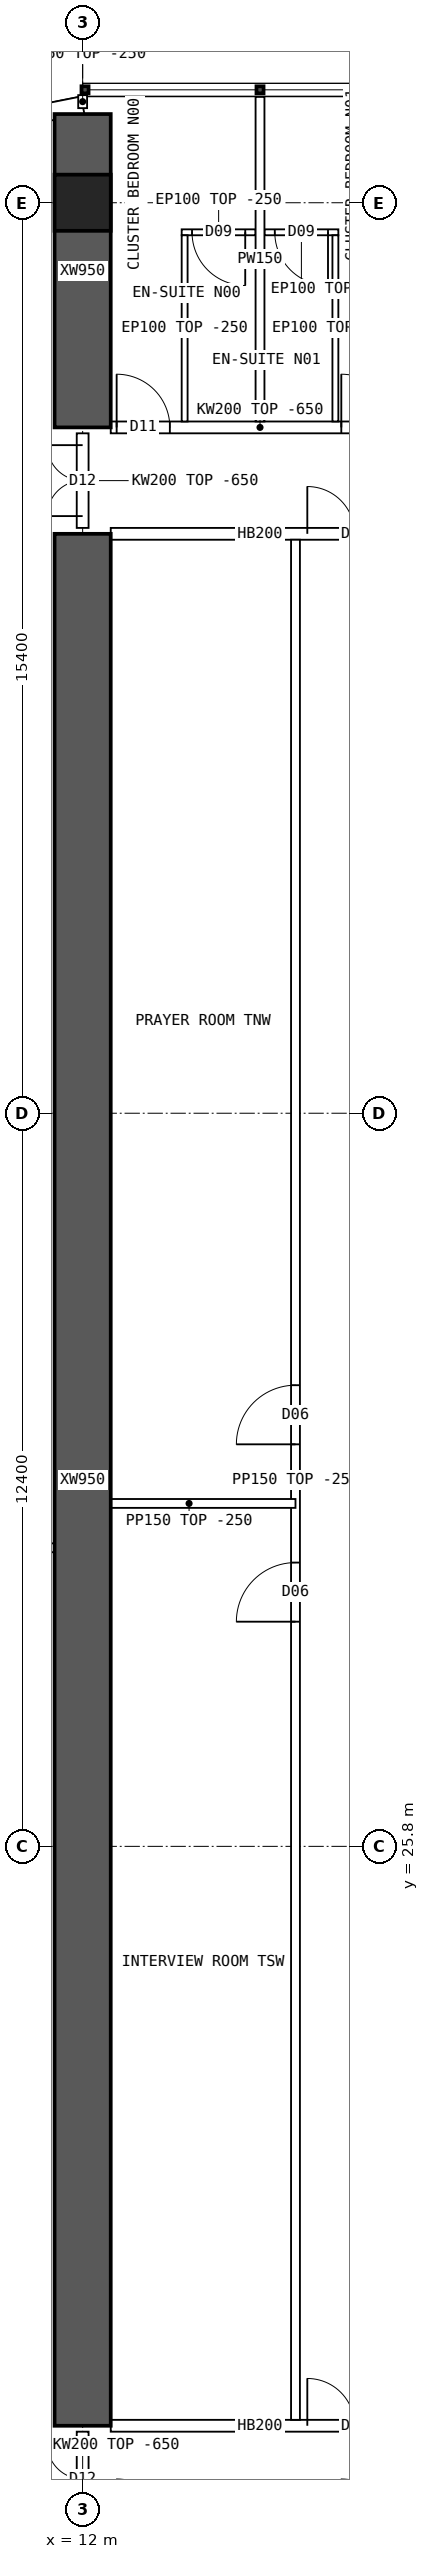
"""IFC4 building model, lengths in metres.
Left out: names, types, materials, properties, quantities, classifications, styles, units other than length and angle.
Written with IfcOpenShell. Run it as: python <this file> out.ifc"""

import sys

from ifc_helpers import new_model, si_unit, direction, frame, frame_2d, origin, origin_2d, place, context, subcontext, project, spatial, polyline, rectangle, hollow_rectangle, outline, extrude, element, fill, save


model = new_model("IFC4")
c1 = context("Model", 3, precision=1e-05, world=origin(), true_north=direction((0.0, 1.0)))
c2 = subcontext(c1, "Body", "Model", "MODEL_VIEW")
j1 = project(units=[si_unit("LENGTHUNIT", "METRE"), si_unit("PLANEANGLEUNIT", "RADIAN")], contexts=[c1])
p1 = place(None, origin())
s1 = spatial("IfcSite", under=j1, at=p1, CompositionType="ELEMENT")
p2 = place(p1, origin())
s2 = spatial("IfcBuilding", under=s1, at=p2, CompositionType="ELEMENT")
p3 = place(p2, frame((0.0, 0.0, 121.9)))
s3 = spatial("IfcBuildingStorey", under=s2, at=p3, CompositionType="ELEMENT", Elevation=121.9)
p4 = place(p3, frame((12.0, 53.6, 0.0), z_axis=(0.0, 0.0, 1.0), x_axis=(1.0, 0.0, 0.0)))
e1 = element("IfcColumn", 1, at=p4, inside=s3, PredefinedType="COLUMN", context=c2, shape_type="SweptSolid", body=[
    extrude(hollow_rectangle(XDim=0.95, YDim=0.95, WallThickness=0.095, at=origin_2d()), origin(), (0.0, 0.0, 1.0), 3.75),
])
p5 = place(p3, frame((12.0, 49.8, 0.0), z_axis=(0.0, 0.0, 1.0), x_axis=(0.0, 1.0, 0.0)))
e2 = element("IfcWall", 2, at=p5, inside=s3, PredefinedType="SHEAR", context=c2, shape_type="SweptSolid", body=[
    extrude(rectangle(XDim=5.3, YDim=0.95, at=frame_2d((2.65, 0.0))), origin(), (0.0, 0.0, 1.0), 3.75),
])
p6 = place(p3, frame((12.0, 16.0, 0.0), z_axis=(0.0, 0.0, 1.0), x_axis=(0.0, 1.0, 0.0)))
e3 = element("IfcWall", 3, at=p6, inside=s3, PredefinedType="SHEAR", context=c2, shape_type="SweptSolid", body=[
    extrude(rectangle(XDim=32.0, YDim=0.95, at=frame_2d((16.0, 0.0))), origin(), (0.0, 0.0, 1.0), 3.75),
])
p7 = place(p3, frame((12.0, 55.25, 0.0), z_axis=(0.0, 0.0, 1.0), x_axis=(-0.980787251524, -0.195080412259, 0.0)))
e4 = element("IfcWall", 4, at=p7, inside=s3, PredefinedType="SOLIDWALL", context=c2, shape_type="SweptSolid", body=[
    extrude(outline(polyline([(-0.03, -0.15), (3.249, -0.15), (3.189, 0.15), (0.03, 0.15), (-0.03, -0.15)])), origin(), (0.0, 0.0, 1.0), 3.5),
])
p8 = place(p7, frame((0.909, 0.0, 0.9)))
e5 = element("IfcOpeningElement", 5, at=p8, cuts=e4, PredefinedType="OPENING", context=c2, shape_type="SweptSolid", body=[
    extrude(rectangle(XDim=1.4, YDim=1.8, at=frame_2d((0.7, 0.9))), frame((0.0, 0.16, 0.0), z_axis=(0.0, -1.0, 0.0), x_axis=(1.0, 0.0, 0.0)), (0.0, 0.0, 1.0), 0.32),
])
p9 = place(p3, frame((12.475, 16.0, 0.0), z_axis=(0.0, 0.0, 1.0), x_axis=(1.0, 0.0, 0.0)))
e6 = element("IfcWall", 6, at=p9, inside=s3, PredefinedType="SOLIDWALL", context=c2, shape_type="SweptSolid", body=[
    extrude(rectangle(XDim=5.05, YDim=0.2, at=frame_2d((2.525, 0.0))), origin(), (0.0, 0.0, 1.0), 3.5),
])
p10 = place(p9, frame((3.325, 0.0, 0.0)))
e7 = element("IfcOpeningElement", 7, at=p10, cuts=e6, PredefinedType="OPENING", context=c2, shape_type="SweptSolid", body=[
    extrude(rectangle(XDim=1.6, YDim=2.1, at=frame_2d((0.8, 1.05))), frame((0.0, 0.11, 0.0), z_axis=(0.0, -1.0, 0.0), x_axis=(1.0, 0.0, 0.0)), (0.0, 0.0, 1.0), 0.22),
])
p11 = place(p3, frame((12.475, 49.8, 0.0), z_axis=(0.0, 0.0, 1.0), x_axis=(1.0, 0.0, 0.0)))
e8 = element("IfcWall", 8, at=p11, inside=s3, PredefinedType="SOLIDWALL", context=c2, shape_type="SweptSolid", body=[
    extrude(outline(polyline([(0.0, 0.0), (5.05, 0.0), (5.05, 3.1), (0.0, 3.1), (0.0, 0.0)])), frame((0.0, 0.1, 0.0), z_axis=(0.0, -1.0, 0.0), x_axis=(1.0, 0.0, 0.0)), (0.0, 0.0, 1.0), 0.2),
])
p12 = place(p11, frame((0.1, 0.0, 0.0)))
e9 = element("IfcOpeningElement", 9, at=p12, cuts=e8, PredefinedType="OPENING", context=c2, shape_type="SweptSolid", body=[
    extrude(rectangle(XDim=0.9, YDim=2.1, at=frame_2d((0.45, 1.05))), frame((0.0, 0.11, 0.0), z_axis=(0.0, -1.0, 0.0), x_axis=(1.0, 0.0, 0.0)), (0.0, 0.0, 1.0), 0.22),
])
p13 = place(p11, frame((3.9, 0.0, 0.0)))
e10 = element("IfcOpeningElement", 10, at=p13, cuts=e8, PredefinedType="OPENING", context=c2, shape_type="SweptSolid", body=[
    extrude(rectangle(XDim=0.9, YDim=2.1, at=frame_2d((0.45, 1.05))), frame((0.0, 0.11, 0.0), z_axis=(0.0, -1.0, 0.0), x_axis=(1.0, 0.0, 0.0)), (0.0, 0.0, 1.0), 0.22),
])
p14 = place(p3, frame((12.475, 48.0, 0.0), z_axis=(0.0, 0.0, 1.0), x_axis=(1.0, 0.0, 0.0)))
e11 = element("IfcWall", 11, at=p14, inside=s3, PredefinedType="SOLIDWALL", context=c2, shape_type="SweptSolid", body=[
    extrude(rectangle(XDim=5.05, YDim=0.2, at=frame_2d((2.525, 0.0))), origin(), (0.0, 0.0, 1.0), 3.5),
])
p15 = place(p14, frame((3.325, 0.0, 0.0)))
e12 = element("IfcOpeningElement", 12, at=p15, cuts=e11, PredefinedType="OPENING", context=c2, shape_type="SweptSolid", body=[
    extrude(rectangle(XDim=1.6, YDim=2.1, at=frame_2d((0.8, 1.05))), frame((0.0, 0.11, 0.0), z_axis=(0.0, -1.0, 0.0), x_axis=(1.0, 0.0, 0.0)), (0.0, 0.0, 1.0), 0.22),
])
p16 = place(p3, frame((15.0, 55.39, 0.0), z_axis=(0.0, 0.0, 1.0), x_axis=(0.0, -1.0, 0.0)))
e13 = element("IfcWall", 13, at=p16, inside=s3, PredefinedType="PARTITIONING", context=c2, shape_type="SweptSolid", body=[
    extrude(outline(polyline([(0.0, 0.0), (5.49, 0.0), (5.49, 3.1), (5.442, 3.1), (5.44, 3.5), (1.992, 3.5), (1.99, 3.1), (1.592, 3.1), (1.59, 3.5), (0.0, 3.5), (0.0, 0.0)])), frame((0.0, 0.075, 0.0), z_axis=(0.0, -1.0, 0.0), x_axis=(1.0, 0.0, 0.0)), (0.0, 0.0, 1.0), 0.15),
])
p17 = place(p3, frame((13.675, 53.1, 0.0), z_axis=(0.0, 0.0, 1.0), x_axis=(1.0, 0.0, 0.0)))
e14 = element("IfcWall", 14, at=p17, inside=s3, PredefinedType="PARTITIONING", context=c2, shape_type="SweptSolid", body=[
    extrude(rectangle(XDim=1.25, YDim=0.1, at=frame_2d((0.625, 0.0))), origin(), (0.0, 0.0, 1.0), 3.5),
])
p18 = place(p17, frame((0.175, 0.0, 0.0)))
e15 = element("IfcOpeningElement", 15, at=p18, cuts=e14, PredefinedType="OPENING", context=c2, shape_type="SweptSolid", body=[
    extrude(rectangle(XDim=0.9, YDim=2.1, at=frame_2d((0.45, 1.05))), frame((0.0, 0.06, 0.0), z_axis=(0.0, -1.0, 0.0), x_axis=(1.0, 0.0, 0.0)), (0.0, 0.0, 1.0), 0.12),
])
p19 = place(p3, frame((13.725, 53.05, 0.0), z_axis=(0.0, 0.0, 1.0), x_axis=(0.0, -1.0, 0.0)))
e16 = element("IfcWall", 16, at=p19, inside=s3, PredefinedType="PARTITIONING", context=c2, shape_type="SweptSolid", body=[
    extrude(outline(polyline([(0.0, 0.0), (3.15, 0.0), (3.15, 3.1), (3.102, 3.1), (3.1, 3.5), (0.0, 3.5), (0.0, 0.0)])), frame((0.0, 0.05, 0.0), z_axis=(0.0, -1.0, 0.0), x_axis=(1.0, 0.0, 0.0)), (0.0, 0.0, 1.0), 0.1),
])
p20 = place(p3, frame((15.075, 53.1, 0.0), z_axis=(0.0, 0.0, 1.0), x_axis=(1.0, 0.0, 0.0)))
e17 = element("IfcWall", 17, at=p20, inside=s3, PredefinedType="PARTITIONING", context=c2, shape_type="SweptSolid", body=[
    extrude(rectangle(XDim=1.25, YDim=0.1, at=frame_2d((0.625, 0.0))), origin(), (0.0, 0.0, 1.0), 3.5),
])
p21 = place(p20, frame((0.175, 0.0, 0.0)))
e18 = element("IfcOpeningElement", 18, at=p21, cuts=e17, PredefinedType="OPENING", context=c2, shape_type="SweptSolid", body=[
    extrude(rectangle(XDim=0.9, YDim=2.1, at=frame_2d((0.45, 1.05))), frame((0.0, 0.06, 0.0), z_axis=(0.0, -1.0, 0.0), x_axis=(1.0, 0.0, 0.0)), (0.0, 0.0, 1.0), 0.12),
])
p22 = place(p3, frame((16.275, 53.05, 0.0), z_axis=(0.0, 0.0, 1.0), x_axis=(0.0, -1.0, 0.0)))
e19 = element("IfcWall", 19, at=p22, inside=s3, PredefinedType="PARTITIONING", context=c2, shape_type="SweptSolid", body=[
    extrude(outline(polyline([(0.0, 0.0), (3.15, 0.0), (3.15, 3.1), (3.102, 3.1), (3.1, 3.5), (0.0, 3.5), (0.0, 0.0)])), frame((0.0, 0.05, 0.0), z_axis=(0.0, -1.0, 0.0), x_axis=(1.0, 0.0, 0.0)), (0.0, 0.0, 1.0), 0.1),
])
p23 = place(p3, frame((15.6, 16.1, 0.0), z_axis=(0.0, 0.0, 1.0), x_axis=(0.0, 1.0, 0.0)))
e20 = element("IfcWall", 20, at=p23, inside=s3, PredefinedType="PARTITIONING", context=c2, shape_type="SweptSolid", body=[
    extrude(rectangle(XDim=31.8, YDim=0.15, at=frame_2d((15.9, 0.0))), origin(), (0.0, 0.0, 1.0), 3.5),
])
p24 = place(p23, frame((13.5, 0.0, 0.0)))
e21 = element("IfcOpeningElement", 21, at=p24, cuts=e20, PredefinedType="OPENING", context=c2, shape_type="SweptSolid", body=[
    extrude(rectangle(XDim=1.0, YDim=2.1, at=frame_2d((0.5, 1.05))), frame((0.0, 0.085, 0.0), z_axis=(0.0, -1.0, 0.0), x_axis=(1.0, 0.0, 0.0)), (0.0, 0.0, 1.0), 0.17),
])
p25 = place(p23, frame((16.5, 0.0, 0.0)))
e22 = element("IfcOpeningElement", 22, at=p25, cuts=e20, PredefinedType="OPENING", context=c2, shape_type="SweptSolid", body=[
    extrude(rectangle(XDim=1.0, YDim=2.1, at=frame_2d((0.5, 1.05))), frame((0.0, 0.085, 0.0), z_axis=(0.0, -1.0, 0.0), x_axis=(1.0, 0.0, 0.0)), (0.0, 0.0, 1.0), 0.17),
])
p26 = place(p3, frame((12.0, 31.6, 0.0), z_axis=(0.0, 0.0, 1.0), x_axis=(1.0, 0.0, 0.0)))
e23 = element("IfcWall", 23, at=p26, inside=s3, PredefinedType="PARTITIONING", context=c2, shape_type="SweptSolid", body=[
    extrude(rectangle(XDim=3.6, YDim=0.15, at=frame_2d((1.8, 0.0))), origin(), (0.0, 0.0, 1.0), 3.5),
])
p27 = place(p3, frame((3.905, 30.85, 0.0), z_axis=(0.0, 0.0, 1.0), x_axis=(1.0, 0.0, 0.0)))
e24 = element("IfcWall", 24, at=p27, inside=s3, PredefinedType="PARTITIONING", context=c2, shape_type="SweptSolid", body=[
    extrude(outline(polyline([(0.0, 0.0), (8.02, 0.0), (8.02, 3.5), (2.397, 3.5), (2.395, 3.05), (1.797, 3.05), (1.795, 3.5), (0.0, 3.5), (0.0, 0.0)])), frame((0.0, 0.075, 0.0), z_axis=(0.0, -1.0, 0.0), x_axis=(1.0, 0.0, 0.0)), (0.0, 0.0, 1.0), 0.15),
])
p28 = place(p3, frame((12.0, 14.3, 0.0), z_axis=(0.0, 0.0, 1.0), x_axis=(0.0, 1.0, 0.0)))
e25 = element("IfcWall", 25, at=p28, inside=s3, PredefinedType="SOLIDWALL", context=c2, shape_type="SweptSolid", body=[
    extrude(outline(polyline([(0.0, 0.0), (1.6, 0.0), (1.6, 3.1), (0.0, 3.1), (0.0, 0.0)])), frame((0.0, 0.1, 0.0), z_axis=(0.0, -1.0, 0.0), x_axis=(1.0, 0.0, 0.0)), (0.0, 0.0, 1.0), 0.2),
])
p29 = place(p28, frame((0.2, 0.0, 0.0)))
e26 = element("IfcOpeningElement", 26, at=p29, cuts=e25, PredefinedType="OPENING", context=c2, shape_type="SweptSolid", body=[
    extrude(rectangle(XDim=1.2, YDim=2.1, at=frame_2d((0.6, 1.05))), frame((0.0, 0.11, 0.0), z_axis=(0.0, -1.0, 0.0), x_axis=(1.0, 0.0, 0.0)), (0.0, 0.0, 1.0), 0.22),
])
p30 = place(p3, frame((12.0, 48.1, 0.0), z_axis=(0.0, 0.0, 1.0), x_axis=(0.0, 1.0, 0.0)))
e27 = element("IfcWall", 27, at=p30, inside=s3, PredefinedType="SOLIDWALL", context=c2, shape_type="SweptSolid", body=[
    extrude(outline(polyline([(0.0, 0.0), (1.6, 0.0), (1.6, 3.1), (0.0, 3.1), (0.0, 0.0)])), frame((0.0, 0.1, 0.0), z_axis=(0.0, -1.0, 0.0), x_axis=(1.0, 0.0, 0.0)), (0.0, 0.0, 1.0), 0.2),
])
p31 = place(p30, frame((0.2, 0.0, 0.0)))
e28 = element("IfcOpeningElement", 28, at=p31, cuts=e27, PredefinedType="OPENING", context=c2, shape_type="SweptSolid", body=[
    extrude(rectangle(XDim=1.2, YDim=2.1, at=frame_2d((0.6, 1.05))), frame((0.0, 0.11, 0.0), z_axis=(0.0, -1.0, 0.0), x_axis=(1.0, 0.0, 0.0)), (0.0, 0.0, 1.0), 0.22),
])
p32 = place(p3, frame((12.0, 55.2, 0.0), z_axis=(0.0, 0.0, 1.0), x_axis=(0.0, 1.0, 0.0)))
e29 = element("IfcWall", 29, at=p32, inside=s3, PredefinedType="PARTITIONING", context=c2, shape_type="SweptSolid", body=[
    extrude(rectangle(XDim=0.22, YDim=0.15, at=frame_2d((0.11, 0.0))), origin(), (0.0, 0.0, 1.0), 3.5),
])
p33 = place(p10, origin())
e30 = element("IfcDoor", 30, at=p33, inside=s3, OperationType="DOUBLE_DOOR_SINGLE_SWING", PredefinedType="DOOR", context=c2, shape_type="SweptSolid", body=[
    extrude(rectangle(XDim=1.6, YDim=2.1, at=frame_2d((0.8, 1.05))), frame((0.0, 0.025, 0.0), z_axis=(0.0, -1.0, 0.0), x_axis=(1.0, 0.0, 0.0)), (0.0, 0.0, 1.0), 0.05),
])
fill(e7, e30)
p34 = place(p15, origin())
e31 = element("IfcDoor", 31, at=p34, inside=s3, OperationType="DOUBLE_DOOR_SINGLE_SWING", PredefinedType="DOOR", context=c2, shape_type="SweptSolid", body=[
    extrude(rectangle(XDim=1.6, YDim=2.1, at=frame_2d((0.8, 1.05))), frame((0.0, 0.025, 0.0), z_axis=(0.0, -1.0, 0.0), x_axis=(1.0, 0.0, 0.0)), (0.0, 0.0, 1.0), 0.05),
])
fill(e12, e31)
p35 = place(p18, origin())
e32 = element("IfcDoor", 32, at=p35, inside=s3, OperationType="SINGLE_SWING_RIGHT", PredefinedType="DOOR", context=c2, shape_type="SweptSolid", body=[
    extrude(rectangle(XDim=0.9, YDim=2.1, at=frame_2d((0.45, 1.05))), frame((0.0, 0.025, 0.0), z_axis=(0.0, -1.0, 0.0), x_axis=(1.0, 0.0, 0.0)), (0.0, 0.0, 1.0), 0.05),
])
fill(e15, e32)
p36 = place(p12, origin())
e33 = element("IfcDoor", 33, at=p36, inside=s3, OperationType="SINGLE_SWING_LEFT", PredefinedType="DOOR", context=c2, shape_type="SweptSolid", body=[
    extrude(rectangle(XDim=0.9, YDim=2.1, at=frame_2d((0.45, 1.05))), frame((0.0, 0.025, 0.0), z_axis=(0.0, -1.0, 0.0), x_axis=(1.0, 0.0, 0.0)), (0.0, 0.0, 1.0), 0.05),
])
fill(e9, e33)
p37 = place(p21, origin())
e34 = element("IfcDoor", 34, at=p37, inside=s3, OperationType="SINGLE_SWING_RIGHT", PredefinedType="DOOR", context=c2, shape_type="SweptSolid", body=[
    extrude(rectangle(XDim=0.9, YDim=2.1, at=frame_2d((0.45, 1.05))), frame((0.0, 0.025, 0.0), z_axis=(0.0, -1.0, 0.0), x_axis=(1.0, 0.0, 0.0)), (0.0, 0.0, 1.0), 0.05),
])
fill(e18, e34)
p38 = place(p13, origin())
e35 = element("IfcDoor", 35, at=p38, inside=s3, OperationType="SINGLE_SWING_LEFT", PredefinedType="DOOR", context=c2, shape_type="SweptSolid", body=[
    extrude(rectangle(XDim=0.9, YDim=2.1, at=frame_2d((0.45, 1.05))), frame((0.0, 0.025, 0.0), z_axis=(0.0, -1.0, 0.0), x_axis=(1.0, 0.0, 0.0)), (0.0, 0.0, 1.0), 0.05),
])
fill(e10, e35)
p39 = place(p24, origin())
e36 = element("IfcDoor", 36, at=p39, inside=s3, OperationType="SINGLE_SWING_LEFT", PredefinedType="DOOR", context=c2, shape_type="SweptSolid", body=[
    extrude(rectangle(XDim=1.0, YDim=2.1, at=frame_2d((0.5, 1.05))), frame((0.0, 0.025, 0.0), z_axis=(0.0, -1.0, 0.0), x_axis=(1.0, 0.0, 0.0)), (0.0, 0.0, 1.0), 0.05),
])
fill(e21, e36)
p40 = place(p25, origin())
e37 = element("IfcDoor", 37, at=p40, inside=s3, OperationType="SINGLE_SWING_LEFT", PredefinedType="DOOR", context=c2, shape_type="SweptSolid", body=[
    extrude(rectangle(XDim=1.0, YDim=2.1, at=frame_2d((0.5, 1.05))), frame((0.0, 0.025, 0.0), z_axis=(0.0, -1.0, 0.0), x_axis=(1.0, 0.0, 0.0)), (0.0, 0.0, 1.0), 0.05),
])
fill(e22, e37)
p41 = place(p29, origin())
e38 = element("IfcDoor", 38, at=p41, inside=s3, OperationType="DOUBLE_DOOR_SINGLE_SWING", PredefinedType="DOOR", context=c2, shape_type="SweptSolid", body=[
    extrude(rectangle(XDim=1.2, YDim=2.1, at=frame_2d((0.6, 1.05))), frame((0.0, 0.025, 0.0), z_axis=(0.0, -1.0, 0.0), x_axis=(1.0, 0.0, 0.0)), (0.0, 0.0, 1.0), 0.05),
])
fill(e26, e38)
p42 = place(p31, origin())
e39 = element("IfcDoor", 39, at=p42, inside=s3, OperationType="DOUBLE_DOOR_SINGLE_SWING", PredefinedType="DOOR", context=c2, shape_type="SweptSolid", body=[
    extrude(rectangle(XDim=1.2, YDim=2.1, at=frame_2d((0.6, 1.05))), frame((0.0, 0.025, 0.0), z_axis=(0.0, -1.0, 0.0), x_axis=(1.0, 0.0, 0.0)), (0.0, 0.0, 1.0), 0.05),
])
fill(e28, e39)
save(model, sys.argv[1])
